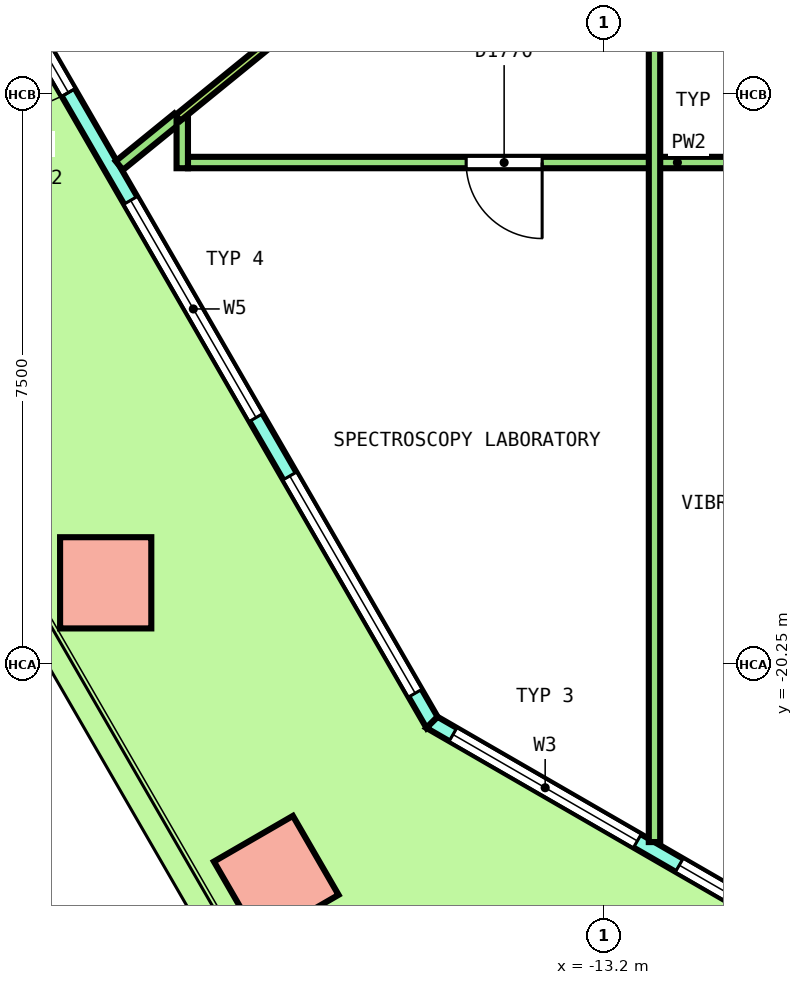
"""IFC4 building model, lengths in metres.
Left out: names, types, materials, properties, quantities, classifications, styles, units other than length and angle.
Written with IfcOpenShell. Run it as: python <this file> out.ifc"""

import sys

from ifc_helpers import new_model, si_unit, direction, frame, frame_2d, origin, origin_2d, place, context, subcontext, project, spatial, polyline, rectangle, outline, extrude, element, fill, save


model = new_model("IFC4")
c1 = context("Model", 3, precision=1e-05, world=origin(), true_north=direction((0.0, 1.0)))
c2 = subcontext(c1, "Body", "Model", "MODEL_VIEW")
j1 = project(units=[si_unit("LENGTHUNIT", "METRE"), si_unit("PLANEANGLEUNIT", "RADIAN")], contexts=[c1])
p1 = place(None, origin())
s1 = spatial("IfcSite", under=j1, at=p1, CompositionType="ELEMENT")
p2 = place(p1, origin())
s2 = spatial("IfcBuilding", under=s1, at=p2, CompositionType="ELEMENT")
p3 = place(p2, frame((0.0, 0.0, 162.8)))
s3 = spatial("IfcBuildingStorey", under=s2, at=p3, CompositionType="ELEMENT", Elevation=162.8)
p4 = place(p3, frame((-19.757, -19.179, 0.0), z_axis=(0.010908253887, -0.018863444567, 0.99976256204), x_axis=(0.500638377412, -0.865382225109, -0.021790354016)))
e1 = element("IfcColumn", 1, at=p4, inside=s3, PredefinedType="COLUMN", context=c2, shape_type="SweptSolid", body=[
    extrude(rectangle(XDim=1.2, YDim=1.2, at=origin_2d()), origin(), (0.0, 0.0, 1.0), 4.051),
])
p5 = place(p3, frame((-17.514, -23.065, 0.0), z_axis=(0.018132595726, -0.031445896907, 0.999340965106), x_axis=(0.865740985748, -0.499504693256, -0.031426215359)))
e2 = element("IfcColumn", 2, at=p5, inside=s3, PredefinedType="COLUMN", context=c2, shape_type="SweptSolid", body=[
    extrude(rectangle(XDim=1.2, YDim=1.2, at=origin_2d()), origin(), (0.0, 0.0, 1.0), 4.053),
])
p6 = place(p3, frame((-25.932, -2.884, 0.0), z_axis=(0.0, 0.0, 1.0), x_axis=(0.499999366442, -0.866025769569, 0.0)))
e3 = element("IfcWall", 3, at=p6, inside=s3, PredefinedType="SOLIDWALL", context=c2, shape_type="SweptSolid", body=[
    extrude(outline(polyline([(-0.027, -0.1), (1.023, -0.1), (2.072, -0.1), (3.122, -0.1), (4.171, -0.1), (5.221, -0.1), (6.27, -0.1), (7.32, -0.1), (8.369, -0.1), (9.419, -0.1), (10.468, -0.1), (11.518, -0.1), (12.567, -0.1), (13.617, -0.1), (14.666, -0.1), (15.716, -0.1), (16.765, -0.1), (17.815, -0.1), (18.864, -0.1), (19.914, -0.1), (20.963, -0.1), (20.91, 0.1), (19.865, 0.1), (18.821, 0.1), (17.777, 0.1), (16.733, 0.1), (15.689, 0.1), (14.645, 0.1), (13.601, 0.1), (12.557, 0.1), (11.512, 0.1), (10.468, 0.1), (9.424, 0.1), (8.38, 0.1), (7.336, 0.1), (6.292, 0.1), (5.248, 0.1), (4.203, 0.1), (3.159, 0.1), (2.115, 0.1), (1.071, 0.1), (0.027, 0.1), (-0.027, -0.1)])), origin(), (0.0, 0.0, 1.0), 4.1),
])
p7 = place(p6, frame((0.444, 0.0, 0.1)))
e4 = element("IfcOpeningElement", 4, at=p7, cuts=e3, PredefinedType="OPENING", context=c2, shape_type="SweptSolid", body=[
    extrude(rectangle(XDim=3.3, YDim=2.9, at=frame_2d((1.65, 1.45))), frame((0.0, 0.11, 0.0), z_axis=(0.0, -1.0, 0.0), x_axis=(1.0, 0.0, 0.0)), (0.0, 0.0, 1.0), 0.22),
])
p8 = place(p6, frame((4.631, 0.0, 0.1)))
e5 = element("IfcOpeningElement", 5, at=p8, cuts=e3, PredefinedType="OPENING", context=c2, shape_type="SweptSolid", body=[
    extrude(rectangle(XDim=3.3, YDim=2.9, at=frame_2d((1.65, 1.45))), frame((0.0, 0.11, 0.0), z_axis=(0.0, -1.0, 0.0), x_axis=(1.0, 0.0, 0.0)), (0.0, 0.0, 1.0), 0.22),
])
p9 = place(p6, frame((9.568, 0.0, 0.0)))
e6 = element("IfcOpeningElement", 6, at=p9, cuts=e3, PredefinedType="OPENING", context=c2, shape_type="SweptSolid", body=[
    extrude(rectangle(XDim=1.8, YDim=2.4, at=frame_2d((0.9, 1.2))), frame((0.0, 0.11, 0.0), z_axis=(0.0, -1.0, 0.0), x_axis=(1.0, 0.0, 0.0)), (0.0, 0.0, 1.0), 0.22),
])
p10 = place(p6, frame((9.568, 0.0, 2.55)))
e7 = element("IfcOpeningElement", 7, at=p10, cuts=e3, PredefinedType="OPENING", context=c2, shape_type="SweptSolid", body=[
    extrude(rectangle(XDim=1.8, YDim=0.45, at=frame_2d((0.9, 0.225))), frame((0.0, 0.11, 0.0), z_axis=(0.0, -1.0, 0.0), x_axis=(1.0, 0.0, 0.0)), (0.0, 0.0, 1.0), 0.22),
])
p11 = place(p6, frame((13.006, 0.0, 0.1)))
e8 = element("IfcOpeningElement", 8, at=p11, cuts=e3, PredefinedType="OPENING", context=c2, shape_type="SweptSolid", body=[
    extrude(rectangle(XDim=3.3, YDim=2.9, at=frame_2d((1.65, 1.45))), frame((0.0, 0.11, 0.0), z_axis=(0.0, -1.0, 0.0), x_axis=(1.0, 0.0, 0.0)), (0.0, 0.0, 1.0), 0.22),
])
p12 = place(p6, frame((17.193, 0.0, 0.1)))
e9 = element("IfcOpeningElement", 9, at=p12, cuts=e3, PredefinedType="OPENING", context=c2, shape_type="SweptSolid", body=[
    extrude(rectangle(XDim=3.3, YDim=2.9, at=frame_2d((1.65, 1.45))), frame((0.0, 0.11, 0.0), z_axis=(0.0, -1.0, 0.0), x_axis=(1.0, 0.0, 0.0)), (0.0, 0.0, 1.0), 0.22),
])
p13 = place(p3, frame((-15.464, -21.016, 0.0), z_axis=(0.0, 0.0, 1.0), x_axis=(0.866029458321, -0.49999297727, 0.0)))
e10 = element("IfcWall", 10, at=p13, inside=s3, PredefinedType="SOLIDWALL", context=c2, shape_type="SweptSolid", body=[
    extrude(outline(polyline([(-0.027, -0.1), (1.128, -0.1), (2.282, -0.1), (3.437, -0.1), (4.592, -0.1), (5.747, -0.1), (6.901, -0.1), (6.848, 0.1), (5.711, 0.1), (4.574, 0.1), (3.437, 0.1), (2.301, 0.1), (1.164, 0.1), (0.027, 0.1), (-0.027, -0.1)])), origin(), (0.0, 0.0, 1.0), 4.1),
])
p14 = place(p13, frame((0.319, 0.0, 0.1)))
e11 = element("IfcOpeningElement", 11, at=p14, cuts=e10, PredefinedType="OPENING", context=c2, shape_type="SweptSolid", body=[
    extrude(rectangle(XDim=2.8, YDim=2.9, at=frame_2d((1.4, 1.45))), frame((0.0, 0.11, 0.0), z_axis=(0.0, -1.0, 0.0), x_axis=(1.0, 0.0, 0.0)), (0.0, 0.0, 1.0), 0.22),
])
p15 = place(p13, frame((3.756, 0.0, 0.1)))
e12 = element("IfcOpeningElement", 12, at=p15, cuts=e10, PredefinedType="OPENING", context=c2, shape_type="SweptSolid", body=[
    extrude(rectangle(XDim=2.8, YDim=2.9, at=frame_2d((1.4, 1.45))), frame((0.0, 0.11, 0.0), z_axis=(0.0, -1.0, 0.0), x_axis=(1.0, 0.0, 0.0)), (0.0, 0.0, 1.0), 0.22),
])
p16 = place(p3, frame((-19.578, -13.69, 0.0), z_axis=(0.0, 0.0, 1.0), x_axis=(0.775730050818, 0.631064884348, 0.0)))
e13 = element("IfcWall", 13, at=p16, inside=s3, PredefinedType="PARTITIONING", context=c2, shape_type="SweptSolid", body=[
    extrude(rectangle(XDim=0.992, YDim=0.15, at=frame_2d((0.496, 0.0))), origin(), (0.0, 0.0, 1.0), 3.05),
])
p17 = place(p3, frame((-18.675, -13.65, 0.0), z_axis=(0.0, 0.0, 1.0), x_axis=(1.0, 0.0, 0.0)))
e14 = element("IfcWall", 14, at=p17, inside=s3, PredefinedType="PARTITIONING", context=c2, shape_type="SweptSolid", body=[
    extrude(rectangle(XDim=12.878, YDim=0.15, at=frame_2d((6.439, 0.0))), origin(), (0.0, 0.0, 1.0), 3.05),
])
p18 = place(p17, frame((3.66, 0.0, 0.0)))
e15 = element("IfcOpeningElement", 15, at=p18, cuts=e14, PredefinedType="OPENING", context=c2, shape_type="SweptSolid", body=[
    extrude(rectangle(XDim=1.0, YDim=2.1, at=frame_2d((0.5, 1.05))), frame((0.0, 0.085, 0.0), z_axis=(0.0, -1.0, 0.0), x_axis=(1.0, 0.0, 0.0)), (0.0, 0.0, 1.0), 0.17),
])
p19 = place(p17, frame((10.174, 0.0, 0.0)))
e16 = element("IfcOpeningElement", 16, at=p19, cuts=e14, PredefinedType="OPENING", context=c2, shape_type="SweptSolid", body=[
    extrude(rectangle(XDim=1.2, YDim=2.1, at=frame_2d((0.6, 1.05))), frame((0.0, 0.085, 0.0), z_axis=(0.0, -1.0, 0.0), x_axis=(1.0, 0.0, 0.0)), (0.0, 0.0, 1.0), 0.17),
])
p20 = place(p3, frame((-18.75, -13.725, 0.0), z_axis=(0.0, 0.0, 1.0), x_axis=(0.0, 1.0, 0.0)))
e17 = element("IfcWall", 17, at=p20, inside=s3, PredefinedType="PARTITIONING", context=c2, shape_type="SweptSolid", body=[
    extrude(rectangle(XDim=0.659, YDim=0.15, at=frame_2d((0.329, 0.0))), origin(), (0.0, 0.0, 1.0), 3.05),
])
p21 = place(p3, frame((-12.537, -22.59, 0.0), z_axis=(0.0, 0.0, 1.0), x_axis=(0.0, 1.0, 0.0)))
e18 = element("IfcWall", 18, at=p21, inside=s3, PredefinedType="PARTITIONING", context=c2, shape_type="SweptSolid", body=[
    extrude(rectangle(XDim=12.265, YDim=0.15, at=frame_2d((6.133, 0.0))), origin(), (0.0, 0.0, 1.0), 3.05),
])
p22 = place(p3, frame((-18.808, -13.064, 0.0), z_axis=(0.0, 0.0, 1.0), x_axis=(0.775677269762, 0.631129759379, 0.0)))
e19 = element("IfcWall", 19, at=p22, inside=s3, PredefinedType="PARTITIONING", context=c2, shape_type="SweptSolid", body=[
    extrude(rectangle(XDim=4.533, YDim=0.1, at=frame_2d((2.267, 0.0))), origin(), (0.0, 0.0, 1.0), 3.05),
])
p23 = place(p9, origin())
e20 = element("IfcDoor", 20, at=p23, inside=s3, OperationType="DOUBLE_DOOR_SINGLE_SWING", PredefinedType="DOOR", context=c2, shape_type="SweptSolid", body=[
    extrude(rectangle(XDim=1.8, YDim=2.4, at=frame_2d((0.9, 1.2))), frame((0.0, 0.025, 0.0), z_axis=(0.0, -1.0, 0.0), x_axis=(1.0, 0.0, 0.0)), (0.0, 0.0, 1.0), 0.05),
])
fill(e6, e20)
p24 = place(p10, origin())
e21 = element("IfcWindow", 21, at=p24, inside=s3, PartitioningType="SINGLE_PANEL", PredefinedType="WINDOW", context=c2, shape_type="SweptSolid", body=[
    extrude(rectangle(XDim=1.8, YDim=0.45, at=frame_2d((0.9, 0.225))), frame((0.0, 0.03, 0.0), z_axis=(0.0, -1.0, 0.0), x_axis=(1.0, 0.0, 0.0)), (0.0, 0.0, 1.0), 0.06),
])
fill(e7, e21)
p25 = place(p11, origin())
e22 = element("IfcWindow", 22, at=p25, inside=s3, PartitioningType="SINGLE_PANEL", PredefinedType="WINDOW", context=c2, shape_type="SweptSolid", body=[
    extrude(rectangle(XDim=3.3, YDim=2.9, at=frame_2d((1.65, 1.45))), frame((0.0, 0.03, 0.0), z_axis=(0.0, -1.0, 0.0), x_axis=(1.0, 0.0, 0.0)), (0.0, 0.0, 1.0), 0.06),
])
fill(e8, e22)
p26 = place(p12, origin())
e23 = element("IfcWindow", 23, at=p26, inside=s3, PartitioningType="SINGLE_PANEL", PredefinedType="WINDOW", context=c2, shape_type="SweptSolid", body=[
    extrude(rectangle(XDim=3.3, YDim=2.9, at=frame_2d((1.65, 1.45))), frame((0.0, 0.03, 0.0), z_axis=(0.0, -1.0, 0.0), x_axis=(1.0, 0.0, 0.0)), (0.0, 0.0, 1.0), 0.06),
])
fill(e9, e23)
p27 = place(p14, origin())
e24 = element("IfcWindow", 24, at=p27, inside=s3, PartitioningType="SINGLE_PANEL", PredefinedType="WINDOW", context=c2, shape_type="SweptSolid", body=[
    extrude(rectangle(XDim=2.8, YDim=2.9, at=frame_2d((1.4, 1.45))), frame((0.0, 0.03, 0.0), z_axis=(0.0, -1.0, 0.0), x_axis=(1.0, 0.0, 0.0)), (0.0, 0.0, 1.0), 0.06),
])
fill(e11, e24)
p28 = place(p15, origin())
e25 = element("IfcWindow", 25, at=p28, inside=s3, PartitioningType="SINGLE_PANEL", PredefinedType="WINDOW", context=c2, shape_type="SweptSolid", body=[
    extrude(rectangle(XDim=2.8, YDim=2.9, at=frame_2d((1.4, 1.45))), frame((0.0, 0.03, 0.0), z_axis=(0.0, -1.0, 0.0), x_axis=(1.0, 0.0, 0.0)), (0.0, 0.0, 1.0), 0.06),
])
fill(e12, e25)
p29 = place(p18, origin())
e26 = element("IfcDoor", 26, at=p29, inside=s3, OperationType="SINGLE_SWING_RIGHT", PredefinedType="DOOR", context=c2, shape_type="SweptSolid", body=[
    extrude(rectangle(XDim=1.0, YDim=2.1, at=frame_2d((0.5, 1.05))), frame((0.0, 0.025, 0.0), z_axis=(0.0, -1.0, 0.0), x_axis=(1.0, 0.0, 0.0)), (0.0, 0.0, 1.0), 0.05),
])
fill(e15, e26)
save(model, sys.argv[1])
